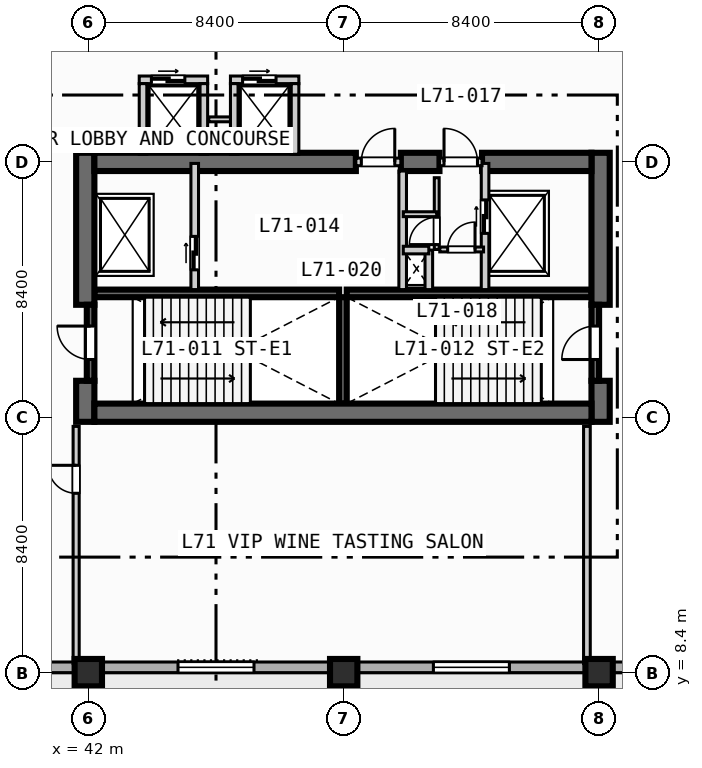
"""IFC4 building model, lengths in metres.
Left out: names, types, materials, properties, quantities, classifications, styles, units other than length and angle.
Written with IfcOpenShell. Run it as: python <this file> out.ifc"""

import sys

from ifc_helpers import new_model, si_unit, direction, frame, frame_2d, origin, origin_2d, place, context, subcontext, project, spatial, rectangle, extrude, element, fill, save


model = new_model("IFC4")
c1 = context("Model", 3, precision=1e-05, world=origin(), true_north=direction((0.0, 1.0)))
c2 = subcontext(c1, "Body", "Model", "MODEL_VIEW")
j1 = project(units=[si_unit("LENGTHUNIT", "METRE"), si_unit("PLANEANGLEUNIT", "RADIAN")], contexts=[c1])
p1 = place(None, origin())
s1 = spatial("IfcSite", under=j1, at=p1, CompositionType="ELEMENT")
p2 = place(p1, origin())
s2 = spatial("IfcBuilding", under=s1, at=p2, CompositionType="ELEMENT")
p3 = place(p2, frame((0.0, 0.0, 286.0)))
s3 = spatial("IfcBuildingStorey", under=s2, at=p3, CompositionType="ELEMENT", Elevation=286.0)
for number, where, z_axis, x_axis in (
    (1, (42.2, 20.875, 0.0), (0.0, 0.0, 1.0), (1.0, 0.0, 0.0)),
    (2, (50.5, 20.875, 0.0), (0.0, 0.0, 1.0), (1.0, 0.0, 0.0)),
):
    element("IfcWall", number, at=place(p3, frame(where, z_axis=z_axis, x_axis=x_axis)), inside=s3, PredefinedType="SOLIDWALL", context=c2, shape_type="SweptSolid", body=[
        extrude(rectangle(XDim=8.05, YDim=0.25, at=frame_2d((4.025, 0.0))), origin(), (0.0, 0.0, 1.0), 4.17),
    ])
p4 = place(p3, frame((50.375, 17.25, 0.0), z_axis=(0.0, 0.0, 1.0), x_axis=(0.0, 1.0, 0.0)))
e3 = element("IfcWall", 3, at=p4, inside=s3, PredefinedType="SOLIDWALL", context=c2, shape_type="SweptSolid", body=[
    extrude(rectangle(XDim=3.5, YDim=0.25, at=frame_2d((1.75, 0.0))), origin(), (0.0, 0.0, 1.0), 4.17),
])
p5 = place(p3, frame((41.9, 16.65, 0.0), z_axis=(0.0, 0.0, 1.0), x_axis=(0.0, 1.0, 0.0)))
e4 = element("IfcWall", 4, at=p5, inside=s3, PredefinedType="SHEAR", context=c2, shape_type="SweptSolid", body=[
    extrude(rectangle(XDim=1.35, YDim=0.6, at=frame_2d((0.675, 0.0))), origin(), (0.0, 0.0, 1.0), 4.17),
])
p6 = place(p3, frame((41.9, 20.5, 0.0), z_axis=(0.0, 0.0, 1.0), x_axis=(0.0, 1.0, 0.0)))
e5 = element("IfcWall", 5, at=p6, inside=s3, PredefinedType="SHEAR", context=c2, shape_type="SweptSolid", body=[
    extrude(rectangle(XDim=5.0, YDim=0.6, at=frame_2d((2.5, 0.0))), origin(), (0.0, 0.0, 1.0), 4.17),
])
p7 = place(p3, frame((58.85, 16.65, 0.0), z_axis=(0.0, 0.0, 1.0), x_axis=(0.0, 1.0, 0.0)))
e6 = element("IfcWall", 6, at=p7, inside=s3, PredefinedType="SHEAR", context=c2, shape_type="SweptSolid", body=[
    extrude(rectangle(XDim=1.35, YDim=0.6, at=frame_2d((0.675, 0.0))), origin(), (0.0, 0.0, 1.0), 4.17),
])
p8 = place(p3, frame((58.85, 20.5, 0.0), z_axis=(0.0, 0.0, 1.0), x_axis=(0.0, 1.0, 0.0)))
e7 = element("IfcWall", 7, at=p8, inside=s3, PredefinedType="SHEAR", context=c2, shape_type="SweptSolid", body=[
    extrude(rectangle(XDim=5.0, YDim=0.6, at=frame_2d((2.5, 0.0))), origin(), (0.0, 0.0, 1.0), 4.17),
])
p9 = place(p3, frame((42.2, 16.95, 0.0), z_axis=(0.0, 0.0, 1.0), x_axis=(1.0, 0.0, 0.0)))
e8 = element("IfcWall", 8, at=p9, inside=s3, PredefinedType="SHEAR", context=c2, shape_type="SweptSolid", body=[
    extrude(rectangle(XDim=16.35, YDim=0.6, at=frame_2d((8.175, 0.0))), origin(), (0.0, 0.0, 1.0), 4.17),
])
p10 = place(p3, frame((42.2, 25.2, 0.0), z_axis=(0.0, 0.0, 1.0), x_axis=(1.0, 0.0, 0.0)))
e9 = element("IfcWall", 9, at=p10, inside=s3, PredefinedType="SHEAR", context=c2, shape_type="SweptSolid", body=[
    extrude(rectangle(XDim=8.6, YDim=0.6, at=frame_2d((4.3, 0.0))), origin(), (0.0, 0.0, 1.0), 4.17),
])
p11 = place(p3, frame((52.28, 25.2, 0.0), z_axis=(0.0, 0.0, 1.0), x_axis=(1.0, 0.0, 0.0)))
e10 = element("IfcWall", 10, at=p11, inside=s3, PredefinedType="SHEAR", context=c2, shape_type="SweptSolid", body=[
    extrude(rectangle(XDim=1.27, YDim=0.6, at=frame_2d((0.635, 0.0))), origin(), (0.0, 0.0, 1.0), 4.17),
])
p12 = place(p3, frame((54.95, 25.2, 0.0), z_axis=(0.0, 0.0, 1.0), x_axis=(1.0, 0.0, 0.0)))
e11 = element("IfcWall", 11, at=p12, inside=s3, PredefinedType="SHEAR", context=c2, shape_type="SweptSolid", body=[
    extrude(rectangle(XDim=3.6, YDim=0.6, at=frame_2d((1.8, 0.0))), origin(), (0.0, 0.0, 1.0), 4.17),
])
for number, where, z_axis, x_axis in (
    (12, (42.0, 8.4, 0.0), (0.0, 0.0, 1.0), (1.0, 0.0, 0.0)),
    (13, (50.4, 8.4, 0.0), (0.0, 0.0, 1.0), (1.0, 0.0, 0.0)),
    (14, (58.8, 8.4, 0.0), (0.0, 0.0, 1.0), (1.0, 0.0, 0.0)),
):
    element("IfcColumn", number, at=place(p3, frame(where, z_axis=z_axis, x_axis=x_axis)), inside=s3, PredefinedType="COLUMN", context=c2, shape_type="SweptSolid", body=[
        extrude(rectangle(XDim=0.9, YDim=0.9, at=origin_2d()), origin(), (0.0, 0.0, 1.0), 4.4),
    ])
p13 = place(p3, frame((64.025, 8.575, 0.0), z_axis=(0.0, 0.0, 1.0), x_axis=(-1.0, 0.0, 0.0)))
e15 = element("IfcWall", 15, at=p13, inside=s3, PredefinedType="STANDARD", context=c2, shape_type="SweptSolid", body=[
    extrude(rectangle(XDim=52.45, YDim=0.35, at=frame_2d((26.225, 0.0))), origin(), (0.0, 0.0, 1.0), 4.17),
])
p14 = place(p13, frame((33.925, 0.0, 0.0)))
e16 = element("IfcOpeningElement", 16, at=p14, cuts=e15, PredefinedType="OPENING", context=c2, shape_type="SweptSolid", body=[
    extrude(rectangle(XDim=1.4, YDim=2.2, at=frame_2d((0.7, 1.1))), frame((0.0, 0.185, 0.0), z_axis=(0.0, -1.0, 0.0), x_axis=(1.0, 0.0, 0.0)), (0.0, 0.0, 1.0), 0.37),
])
p15 = place(p13, frame((16.575, 0.0, 0.85)))
e17 = element("IfcOpeningElement", 17, at=p15, cuts=e15, PredefinedType="OPENING", context=c2, shape_type="SweptSolid", body=[
    extrude(rectangle(XDim=2.5, YDim=2.2, at=frame_2d((1.25, 1.1))), frame((0.0, 0.185, 0.0), z_axis=(0.0, -1.0, 0.0), x_axis=(1.0, 0.0, 0.0)), (0.0, 0.0, 1.0), 0.37),
])
p16 = place(p13, frame((8.175, 0.0, 0.85)))
e18 = element("IfcOpeningElement", 18, at=p16, cuts=e15, PredefinedType="OPENING", context=c2, shape_type="SweptSolid", body=[
    extrude(rectangle(XDim=2.5, YDim=2.2, at=frame_2d((1.25, 1.1))), frame((0.0, 0.185, 0.0), z_axis=(0.0, -1.0, 0.0), x_axis=(1.0, 0.0, 0.0)), (0.0, 0.0, 1.0), 0.37),
])
p17 = place(p3, frame((42.075, 18.0, 0.0), z_axis=(0.0, 0.0, 1.0), x_axis=(0.0, 1.0, 0.0)))
e19 = element("IfcWall", 19, at=p17, inside=s3, PredefinedType="SOLIDWALL", context=c2, shape_type="SweptSolid", body=[
    extrude(rectangle(XDim=2.5, YDim=0.25, at=frame_2d((1.25, 0.0))), origin(), (0.0, 0.0, 1.0), 4.17),
])
p18 = place(p17, frame((0.7, 0.0, 0.0)))
e20 = element("IfcOpeningElement", 20, at=p18, cuts=e19, PredefinedType="OPENING", context=c2, shape_type="SweptSolid", body=[
    extrude(rectangle(XDim=1.1, YDim=2.15, at=frame_2d((0.55, 1.075))), frame((0.0, 0.135, 0.0), z_axis=(0.0, -1.0, 0.0), x_axis=(1.0, 0.0, 0.0)), (0.0, 0.0, 1.0), 0.27),
])
p19 = place(p3, frame((58.675, 18.0, 0.0), z_axis=(0.0, 0.0, 1.0), x_axis=(0.0, 1.0, 0.0)))
e21 = element("IfcWall", 21, at=p19, inside=s3, PredefinedType="SOLIDWALL", context=c2, shape_type="SweptSolid", body=[
    extrude(rectangle(XDim=2.5, YDim=0.25, at=frame_2d((1.25, 0.0))), origin(), (0.0, 0.0, 1.0), 4.17),
])
p20 = place(p19, frame((0.7, 0.0, 0.0)))
e22 = element("IfcOpeningElement", 22, at=p20, cuts=e21, PredefinedType="OPENING", context=c2, shape_type="SweptSolid", body=[
    extrude(rectangle(XDim=1.1, YDim=2.15, at=frame_2d((0.55, 1.075))), frame((0.0, 0.135, 0.0), z_axis=(0.0, -1.0, 0.0), x_axis=(1.0, 0.0, 0.0)), (0.0, 0.0, 1.0), 0.27),
])
p21 = place(p3, frame((45.5, 21.0, 0.0), z_axis=(0.0, 0.0, 1.0), x_axis=(0.0, 1.0, 0.0)))
e23 = element("IfcWall", 23, at=p21, inside=s3, PredefinedType="SOLIDWALL", context=c2, shape_type="SweptSolid", body=[
    extrude(rectangle(XDim=4.15, YDim=0.25, at=frame_2d((2.075, 0.0))), origin(), (0.0, 0.0, 1.0), 4.17),
])
p22 = place(p21, frame((0.65, 0.0, 0.0)))
e24 = element("IfcOpeningElement", 24, at=p22, cuts=e23, PredefinedType="OPENING", context=c2, shape_type="SweptSolid", body=[
    extrude(rectangle(XDim=1.1, YDim=2.15, at=frame_2d((0.55, 1.075))), frame((0.0, 0.135, 0.0), z_axis=(0.0, -1.0, 0.0), x_axis=(1.0, 0.0, 0.0)), (0.0, 0.0, 1.0), 0.27),
])
p23 = place(p3, frame((50.8, 25.2, 0.0), z_axis=(0.0, 0.0, 1.0), x_axis=(1.0, 0.0, 0.0)))
e25 = element("IfcWall", 25, at=p23, inside=s3, PredefinedType="SOLIDWALL", context=c2, shape_type="SweptSolid", body=[
    extrude(rectangle(XDim=1.48, YDim=0.25, at=frame_2d((0.74, 0.0))), origin(), (0.0, 0.0, 1.0), 4.17),
])
p24 = place(p23, frame((0.18, 0.0, 0.0)))
e26 = element("IfcOpeningElement", 26, at=p24, cuts=e25, PredefinedType="OPENING", context=c2, shape_type="SweptSolid", body=[
    extrude(rectangle(XDim=1.1, YDim=2.15, at=frame_2d((0.55, 1.075))), frame((0.0, 0.135, 0.0), z_axis=(0.0, -1.0, 0.0), x_axis=(1.0, 0.0, 0.0)), (0.0, 0.0, 1.0), 0.27),
])
p25 = place(p3, frame((52.34, 21.0, 0.0), z_axis=(0.0, 0.0, 1.0), x_axis=(0.0, 1.0, 0.0)))
e27 = element("IfcWall", 27, at=p25, inside=s3, PredefinedType="SOLIDWALL", context=c2, shape_type="SweptSolid", body=[
    extrude(rectangle(XDim=3.9, YDim=0.25, at=frame_2d((1.95, 0.0))), origin(), (0.0, 0.0, 1.0), 4.17),
])
p26 = place(p3, frame((55.05, 21.0, 0.0), z_axis=(0.0, 0.0, 1.0), x_axis=(0.0, 1.0, 0.0)))
e28 = element("IfcWall", 28, at=p26, inside=s3, PredefinedType="SOLIDWALL", context=c2, shape_type="SweptSolid", body=[
    extrude(rectangle(XDim=4.15, YDim=0.25, at=frame_2d((2.075, 0.0))), origin(), (0.0, 0.0, 1.0), 4.17),
])
p27 = place(p26, frame((1.85, 0.0, 0.0)))
e29 = element("IfcOpeningElement", 29, at=p27, cuts=e28, PredefinedType="OPENING", context=c2, shape_type="SweptSolid", body=[
    extrude(rectangle(XDim=1.1, YDim=2.15, at=frame_2d((0.55, 1.075))), frame((0.0, 0.135, 0.0), z_axis=(0.0, -1.0, 0.0), x_axis=(1.0, 0.0, 0.0)), (0.0, 0.0, 1.0), 0.27),
])
p28 = place(p3, frame((53.55, 25.2, 0.0), z_axis=(0.0, 0.0, 1.0), x_axis=(1.0, 0.0, 0.0)))
e30 = element("IfcWall", 30, at=p28, inside=s3, PredefinedType="SOLIDWALL", context=c2, shape_type="SweptSolid", body=[
    extrude(rectangle(XDim=1.4, YDim=0.25, at=frame_2d((0.7, 0.0))), origin(), (0.0, 0.0, 1.0), 4.17),
])
p29 = place(p28, frame((0.15, 0.0, 0.0)))
e31 = element("IfcOpeningElement", 31, at=p29, cuts=e30, PredefinedType="OPENING", context=c2, shape_type="SweptSolid", body=[
    extrude(rectangle(XDim=1.1, YDim=2.15, at=frame_2d((0.55, 1.075))), frame((0.0, 0.135, 0.0), z_axis=(0.0, -1.0, 0.0), x_axis=(1.0, 0.0, 0.0)), (0.0, 0.0, 1.0), 0.27),
])
p30 = place(p3, frame((53.2, 21.0, 0.0), z_axis=(0.0, 0.0, 1.0), x_axis=(0.0, 1.0, 0.0)))
e32 = element("IfcWall", 32, at=p30, inside=s3, PredefinedType="SOLIDWALL", context=c2, shape_type="SweptSolid", body=[
    extrude(rectangle(XDim=1.3, YDim=0.25, at=frame_2d((0.65, 0.0))), origin(), (0.0, 0.0, 1.0), 4.17),
])
p31 = place(p3, frame((52.36, 22.3, 0.0), z_axis=(0.0, 0.0, 1.0), x_axis=(1.0, 0.0, 0.0)))
e33 = element("IfcWall", 33, at=p31, inside=s3, PredefinedType="SOLIDWALL", context=c2, shape_type="SweptSolid", body=[
    extrude(rectangle(XDim=0.84, YDim=0.25, at=frame_2d((0.42, 0.0))), origin(), (0.0, 0.0, 1.0), 4.17),
])
p32 = place(p3, frame((53.56, 22.32, 0.0), z_axis=(0.0, 0.0, 1.0), x_axis=(1.0, 0.0, 0.0)))
e34 = element("IfcWall", 34, at=p32, inside=s3, PredefinedType="PARTITIONING", context=c2, shape_type="SweptSolid", body=[
    extrude(rectangle(XDim=1.44, YDim=0.16, at=frame_2d((0.72, 0.0))), origin(), (0.0, 0.0, 1.0), 4.17),
])
p33 = place(p32, frame((0.26, 0.0, 0.0)))
e35 = element("IfcOpeningElement", 35, at=p33, cuts=e34, PredefinedType="OPENING", context=c2, shape_type="SweptSolid", body=[
    extrude(rectangle(XDim=0.9, YDim=2.1, at=frame_2d((0.45, 1.05))), frame((0.0, 0.09, 0.0), z_axis=(0.0, -1.0, 0.0), x_axis=(1.0, 0.0, 0.0)), (0.0, 0.0, 1.0), 0.18),
])
p34 = place(p3, frame((53.46, 22.32, 0.0), z_axis=(0.0, 0.0, 1.0), x_axis=(0.0, 1.0, 0.0)))
e36 = element("IfcWall", 36, at=p34, inside=s3, PredefinedType="PARTITIONING", context=c2, shape_type="SweptSolid", body=[
    extrude(rectangle(XDim=2.36, YDim=0.16, at=frame_2d((1.18, 0.0))), origin(), (0.0, 0.0, 1.0), 4.17),
])
p35 = place(p34, frame((0.16, 0.0, 0.0)))
e37 = element("IfcOpeningElement", 37, at=p35, cuts=e36, PredefinedType="OPENING", context=c2, shape_type="SweptSolid", body=[
    extrude(rectangle(XDim=0.9, YDim=2.1, at=frame_2d((0.45, 1.05))), frame((0.0, 0.09, 0.0), z_axis=(0.0, -1.0, 0.0), x_axis=(1.0, 0.0, 0.0)), (0.0, 0.0, 1.0), 0.18),
])
p36 = place(p3, frame((52.36, 23.48, 0.0), z_axis=(0.0, 0.0, 1.0), x_axis=(1.0, 0.0, 0.0)))
e38 = element("IfcWall", 38, at=p36, inside=s3, PredefinedType="PARTITIONING", context=c2, shape_type="SweptSolid", body=[
    extrude(rectangle(XDim=1.1, YDim=0.16, at=frame_2d((0.55, 0.0))), origin(), (0.0, 0.0, 1.0), 4.17),
])
p37 = place(p3, frame((43.675, 27.9, 0.0), z_axis=(0.0, 0.0, 1.0), x_axis=(1.0, 0.0, 0.0)))
e39 = element("IfcWall", 39, at=p37, inside=s3, PredefinedType="SOLIDWALL", context=c2, shape_type="SweptSolid", body=[
    extrude(rectangle(XDim=2.25, YDim=0.25, at=frame_2d((1.125, 0.0))), origin(), (0.0, 0.0, 1.0), 4.17),
])
p38 = place(p37, frame((0.4, 0.0, 0.0)))
e40 = element("IfcOpeningElement", 40, at=p38, cuts=e39, PredefinedType="OPENING", context=c2, shape_type="SweptSolid", body=[
    extrude(rectangle(XDim=1.1, YDim=2.15, at=frame_2d((0.55, 1.075))), frame((0.0, 0.135, 0.0), z_axis=(0.0, -1.0, 0.0), x_axis=(1.0, 0.0, 0.0)), (0.0, 0.0, 1.0), 0.27),
])
for number, where, z_axis, x_axis in (
    (41, (43.8, 25.45, 0.0), (0.0, 0.0, 1.0), (0.0, 1.0, 0.0)),
    (42, (45.8, 25.45, 0.0), (0.0, 0.0, 1.0), (0.0, 1.0, 0.0)),
):
    element("IfcWall", number, at=place(p3, frame(where, z_axis=z_axis, x_axis=x_axis)), inside=s3, PredefinedType="SOLIDWALL", context=c2, shape_type="SweptSolid", body=[
        extrude(rectangle(XDim=2.325, YDim=0.25, at=frame_2d((1.163, 0.0))), origin(), (0.0, 0.0, 1.0), 4.17),
    ])
p39 = place(p3, frame((45.96, 26.6, 0.0), z_axis=(0.0, 0.0, 1.0), x_axis=(1.0, 0.0, 0.0)))
e43 = element("IfcWall", 43, at=p39, inside=s3, PredefinedType="PARTITIONING", context=c2, shape_type="SweptSolid", body=[
    extrude(rectangle(XDim=0.88, YDim=0.16, at=frame_2d((0.44, 0.0))), origin(), (0.0, 0.0, 1.0), 4.17),
])
p40 = place(p3, frame((46.675, 27.9, 0.0), z_axis=(0.0, 0.0, 1.0), x_axis=(1.0, 0.0, 0.0)))
e44 = element("IfcWall", 44, at=p40, inside=s3, PredefinedType="SOLIDWALL", context=c2, shape_type="SweptSolid", body=[
    extrude(rectangle(XDim=2.25, YDim=0.25, at=frame_2d((1.125, 0.0))), origin(), (0.0, 0.0, 1.0), 4.17),
])
p41 = place(p40, frame((0.4, 0.0, 0.0)))
e45 = element("IfcOpeningElement", 45, at=p41, cuts=e44, PredefinedType="OPENING", context=c2, shape_type="SweptSolid", body=[
    extrude(rectangle(XDim=1.1, YDim=2.15, at=frame_2d((0.55, 1.075))), frame((0.0, 0.135, 0.0), z_axis=(0.0, -1.0, 0.0), x_axis=(1.0, 0.0, 0.0)), (0.0, 0.0, 1.0), 0.27),
])
for number, where, z_axis, x_axis in (
    (46, (46.8, 25.45, 0.0), (0.0, 0.0, 1.0), (0.0, 1.0, 0.0)),
    (47, (48.8, 25.45, 0.0), (0.0, 0.0, 1.0), (0.0, 1.0, 0.0)),
):
    element("IfcWall", number, at=place(p3, frame(where, z_axis=z_axis, x_axis=x_axis)), inside=s3, PredefinedType="SOLIDWALL", context=c2, shape_type="SweptSolid", body=[
        extrude(rectangle(XDim=2.325, YDim=0.25, at=frame_2d((1.163, 0.0))), origin(), (0.0, 0.0, 1.0), 4.17),
    ])
p42 = place(p3, frame((41.6, 8.7, 0.0), z_axis=(0.0, 0.0, 1.0), x_axis=(0.0, 1.0, 0.0)))
e48 = element("IfcWall", 48, at=p42, inside=s3, PredefinedType="PARTITIONING", context=c2, shape_type="SweptSolid", body=[
    extrude(rectangle(XDim=7.8, YDim=0.2, at=frame_2d((3.9, 0.0))), origin(), (0.0, 0.0, 1.0), 4.17),
])
p43 = place(p42, frame((5.6, 0.0, 0.0)))
e49 = element("IfcOpeningElement", 49, at=p43, cuts=e48, PredefinedType="OPENING", context=c2, shape_type="SweptSolid", body=[
    extrude(rectangle(XDim=0.92, YDim=2.1, at=frame_2d((0.46, 1.05))), frame((0.0, 0.11, 0.0), z_axis=(0.0, -1.0, 0.0), x_axis=(1.0, 0.0, 0.0)), (0.0, 0.0, 1.0), 0.22),
])
p44 = place(p3, frame((58.4, 8.7, 0.0), z_axis=(0.0, 0.0, 1.0), x_axis=(0.0, 1.0, 0.0)))
e50 = element("IfcWall", 50, at=p44, inside=s3, PredefinedType="PARTITIONING", context=c2, shape_type="SweptSolid", body=[
    extrude(rectangle(XDim=7.8, YDim=0.22, at=frame_2d((3.9, 0.0))), origin(), (0.0, 0.0, 1.0), 4.17),
])
p45 = place(p15, origin())
e51 = element("IfcWindow", 51, at=p45, inside=s3, PartitioningType="SINGLE_PANEL", PredefinedType="WINDOW", context=c2, shape_type="SweptSolid", body=[
    extrude(rectangle(XDim=2.5, YDim=2.2, at=frame_2d((1.25, 1.1))), frame((0.0, 0.03, 0.0), z_axis=(0.0, -1.0, 0.0), x_axis=(1.0, 0.0, 0.0)), (0.0, 0.0, 1.0), 0.06),
])
fill(e17, e51)
p46 = place(p16, origin())
e52 = element("IfcWindow", 52, at=p46, inside=s3, PartitioningType="SINGLE_PANEL", PredefinedType="WINDOW", context=c2, shape_type="SweptSolid", body=[
    extrude(rectangle(XDim=2.5, YDim=2.2, at=frame_2d((1.25, 1.1))), frame((0.0, 0.03, 0.0), z_axis=(0.0, -1.0, 0.0), x_axis=(1.0, 0.0, 0.0)), (0.0, 0.0, 1.0), 0.06),
])
fill(e18, e52)
p47 = place(p18, origin())
e53 = element("IfcDoor", 53, at=p47, inside=s3, OperationType="SINGLE_SWING_RIGHT", PredefinedType="DOOR", context=c2, shape_type="SweptSolid", body=[
    extrude(rectangle(XDim=1.1, YDim=2.15, at=frame_2d((0.55, 1.075))), frame((0.0, 0.025, 0.0), z_axis=(0.0, -1.0, 0.0), x_axis=(1.0, 0.0, 0.0)), (0.0, 0.0, 1.0), 0.05),
])
fill(e20, e53)
p48 = place(p20, origin())
e54 = element("IfcDoor", 54, at=p48, inside=s3, OperationType="SINGLE_SWING_LEFT", PredefinedType="DOOR", context=c2, shape_type="SweptSolid", body=[
    extrude(rectangle(XDim=1.1, YDim=2.15, at=frame_2d((0.55, 1.075))), frame((0.0, 0.025, 0.0), z_axis=(0.0, -1.0, 0.0), x_axis=(1.0, 0.0, 0.0)), (0.0, 0.0, 1.0), 0.05),
])
fill(e22, e54)
p49 = place(p22, origin())
e55 = element("IfcDoor", 55, at=p49, inside=s3, OperationType="SLIDING_TO_LEFT", PredefinedType="DOOR", context=c2, shape_type="SweptSolid", body=[
    extrude(rectangle(XDim=1.1, YDim=2.15, at=frame_2d((0.55, 1.075))), frame((0.0, 0.025, 0.0), z_axis=(0.0, -1.0, 0.0), x_axis=(1.0, 0.0, 0.0)), (0.0, 0.0, 1.0), 0.05),
])
fill(e24, e55)
p50 = place(p24, origin())
e56 = element("IfcDoor", 56, at=p50, inside=s3, OperationType="SINGLE_SWING_RIGHT", PredefinedType="DOOR", context=c2, shape_type="SweptSolid", body=[
    extrude(rectangle(XDim=1.1, YDim=2.15, at=frame_2d((0.55, 1.075))), frame((0.0, 0.025, 0.0), z_axis=(0.0, -1.0, 0.0), x_axis=(1.0, 0.0, 0.0)), (0.0, 0.0, 1.0), 0.05),
])
fill(e26, e56)
p51 = place(p27, origin())
e57 = element("IfcDoor", 57, at=p51, inside=s3, OperationType="SLIDING_TO_LEFT", PredefinedType="DOOR", context=c2, shape_type="SweptSolid", body=[
    extrude(rectangle(XDim=1.1, YDim=2.15, at=frame_2d((0.55, 1.075))), frame((0.0, 0.025, 0.0), z_axis=(0.0, -1.0, 0.0), x_axis=(1.0, 0.0, 0.0)), (0.0, 0.0, 1.0), 0.05),
])
fill(e29, e57)
p52 = place(p29, origin())
e58 = element("IfcDoor", 58, at=p52, inside=s3, OperationType="SINGLE_SWING_LEFT", PredefinedType="DOOR", context=c2, shape_type="SweptSolid", body=[
    extrude(rectangle(XDim=1.1, YDim=2.15, at=frame_2d((0.55, 1.075))), frame((0.0, 0.025, 0.0), z_axis=(0.0, -1.0, 0.0), x_axis=(1.0, 0.0, 0.0)), (0.0, 0.0, 1.0), 0.05),
])
fill(e31, e58)
p53 = place(p33, origin())
e59 = element("IfcDoor", 59, at=p53, inside=s3, OperationType="SINGLE_SWING_RIGHT", PredefinedType="DOOR", context=c2, shape_type="SweptSolid", body=[
    extrude(rectangle(XDim=0.9, YDim=2.1, at=frame_2d((0.45, 1.05))), frame((0.0, 0.025, 0.0), z_axis=(0.0, -1.0, 0.0), x_axis=(1.0, 0.0, 0.0)), (0.0, 0.0, 1.0), 0.05),
])
fill(e35, e59)
p54 = place(p35, origin())
e60 = element("IfcDoor", 60, at=p54, inside=s3, OperationType="SINGLE_SWING_LEFT", PredefinedType="DOOR", context=c2, shape_type="SweptSolid", body=[
    extrude(rectangle(XDim=0.9, YDim=2.1, at=frame_2d((0.45, 1.05))), frame((0.0, 0.025, 0.0), z_axis=(0.0, -1.0, 0.0), x_axis=(1.0, 0.0, 0.0)), (0.0, 0.0, 1.0), 0.05),
])
fill(e37, e60)
p55 = place(p38, origin())
e61 = element("IfcDoor", 61, at=p55, inside=s3, OperationType="SLIDING_TO_LEFT", PredefinedType="DOOR", context=c2, shape_type="SweptSolid", body=[
    extrude(rectangle(XDim=1.1, YDim=2.15, at=frame_2d((0.55, 1.075))), frame((0.0, 0.025, 0.0), z_axis=(0.0, -1.0, 0.0), x_axis=(1.0, 0.0, 0.0)), (0.0, 0.0, 1.0), 0.05),
])
fill(e40, e61)
p56 = place(p41, origin())
e62 = element("IfcDoor", 62, at=p56, inside=s3, OperationType="SLIDING_TO_LEFT", PredefinedType="DOOR", context=c2, shape_type="SweptSolid", body=[
    extrude(rectangle(XDim=1.1, YDim=2.15, at=frame_2d((0.55, 1.075))), frame((0.0, 0.025, 0.0), z_axis=(0.0, -1.0, 0.0), x_axis=(1.0, 0.0, 0.0)), (0.0, 0.0, 1.0), 0.05),
])
fill(e45, e62)
p57 = place(p43, origin())
e63 = element("IfcDoor", 63, at=p57, inside=s3, OperationType="SINGLE_SWING_RIGHT", PredefinedType="DOOR", context=c2, shape_type="SweptSolid", body=[
    extrude(rectangle(XDim=0.92, YDim=2.1, at=frame_2d((0.46, 1.05))), frame((0.0, 0.025, 0.0), z_axis=(0.0, -1.0, 0.0), x_axis=(1.0, 0.0, 0.0)), (0.0, 0.0, 1.0), 0.05),
])
fill(e49, e63)
save(model, sys.argv[1])
